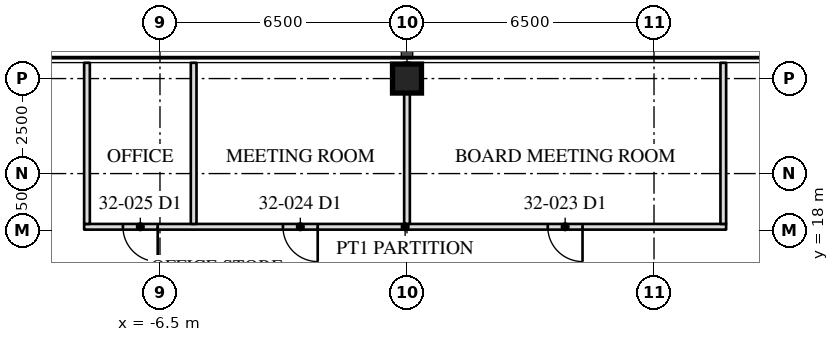
"""IFC4 building model, lengths in metres.
Left out: names, types, materials, properties, quantities, classifications, styles, units other than length and angle.
Written with IfcOpenShell. Run it as: python <this file> out.ifc"""

import sys

from ifc_helpers import new_model, si_unit, direction, frame, frame_2d, origin, origin_2d, place, context, subcontext, project, spatial, rectangle, hollow_rectangle, extrude, element, fill, save


model = new_model("IFC4")
c1 = context("Model", 3, precision=1e-05, world=origin(), true_north=direction((0.0, 1.0)))
c2 = subcontext(c1, "Body", "Model", "MODEL_VIEW")
j1 = project(units=[si_unit("LENGTHUNIT", "METRE"), si_unit("PLANEANGLEUNIT", "RADIAN")], contexts=[c1])
p1 = place(None, origin())
s1 = spatial("IfcSite", under=j1, at=p1, CompositionType="ELEMENT")
p2 = place(p1, origin())
s2 = spatial("IfcBuilding", under=s1, at=p2, CompositionType="ELEMENT")
p3 = place(p2, frame((0.0, 0.0, 137.7)))
s3 = spatial("IfcBuildingStorey", under=s2, at=p3, CompositionType="ELEMENT", Elevation=137.7)
p4 = place(p3, frame((0.0, 22.0, 0.0), z_axis=(0.0, 0.0, 1.0), x_axis=(1.0, 0.0, 0.0)))
e1 = element("IfcColumn", 1, at=p4, inside=s3, PredefinedType="COLUMN", context=c2, shape_type="SweptSolid", body=[
    extrude(hollow_rectangle(XDim=0.762, YDim=0.762, WallThickness=0.076, at=origin_2d()), origin(), (0.0, 0.0, 1.0), 4.1),
])
p5 = place(p3, frame((8.398, 18.1, 0.0), z_axis=(0.0, 0.0, 1.0), x_axis=(-1.0, 0.0, 0.0)))
e2 = element("IfcWall", 2, at=p5, inside=s3, PredefinedType="PARTITIONING", context=c2, shape_type="SweptSolid", body=[
    extrude(rectangle(XDim=16.894, YDim=0.15, at=frame_2d((8.447, 0.0))), origin(), (0.0, 0.0, 1.0), 3.91),
])
p6 = place(p5, frame((3.779, 0.0, 0.0)))
e3 = element("IfcOpeningElement", 3, at=p6, cuts=e2, PredefinedType="OPENING", context=c2, shape_type="SweptSolid", body=[
    extrude(rectangle(XDim=0.915, YDim=2.134, at=frame_2d((0.458, 1.067))), frame((0.0, 0.085, 0.0), z_axis=(0.0, -1.0, 0.0), x_axis=(1.0, 0.0, 0.0)), (0.0, 0.0, 1.0), 0.17),
])
p7 = place(p5, frame((10.748, 0.0, 0.0)))
e4 = element("IfcOpeningElement", 4, at=p7, cuts=e2, PredefinedType="OPENING", context=c2, shape_type="SweptSolid", body=[
    extrude(rectangle(XDim=0.915, YDim=2.134, at=frame_2d((0.458, 1.067))), frame((0.0, 0.085, 0.0), z_axis=(0.0, -1.0, 0.0), x_axis=(1.0, 0.0, 0.0)), (0.0, 0.0, 1.0), 0.17),
])
p8 = place(p5, frame((14.958, 0.0, 0.0)))
e5 = element("IfcOpeningElement", 5, at=p8, cuts=e2, PredefinedType="OPENING", context=c2, shape_type="SweptSolid", body=[
    extrude(rectangle(XDim=0.915, YDim=2.134, at=frame_2d((0.458, 1.067))), frame((0.0, 0.085, 0.0), z_axis=(0.0, -1.0, 0.0), x_axis=(1.0, 0.0, 0.0)), (0.0, 0.0, 1.0), 0.17),
])
p9 = place(p3, frame((8.323, 18.175, 0.0), z_axis=(0.0, 0.0, 1.0), x_axis=(0.0, 1.0, 0.0)))
e6 = element("IfcWall", 6, at=p9, inside=s3, PredefinedType="PARTITIONING", context=c2, shape_type="SweptSolid", body=[
    extrude(rectangle(XDim=4.24, YDim=0.15, at=frame_2d((2.12, 0.0))), origin(), (0.0, 0.0, 1.0), 3.91),
])
p10 = place(p3, frame((0.0, 18.175, 0.0), z_axis=(0.0, 0.0, 1.0), x_axis=(0.0, 1.0, 0.0)))
e7 = element("IfcWall", 7, at=p10, inside=s3, PredefinedType="PARTITIONING", context=c2, shape_type="SweptSolid", body=[
    extrude(rectangle(XDim=4.24, YDim=0.15, at=frame_2d((2.12, 0.0))), origin(), (0.0, 0.0, 1.0), 3.326),
])
for number, where, z_axis, x_axis in (
    (8, (-5.614, 18.175, 0.0), (0.0, 0.0, 1.0), (0.0, 1.0, 0.0)),
    (9, (-8.421, 18.175, 0.0), (0.0, 0.0, 1.0), (0.0, 1.0, 0.0)),
):
    element("IfcWall", number, at=place(p3, frame(where, z_axis=z_axis, x_axis=x_axis)), inside=s3, PredefinedType="PARTITIONING", context=c2, shape_type="SweptSolid", body=[
        extrude(rectangle(XDim=4.24, YDim=0.15, at=frame_2d((2.12, 0.0))), origin(), (0.0, 0.0, 1.0), 3.91),
    ])
p11 = place(p6, origin())
e10 = element("IfcDoor", 10, at=p11, inside=s3, OperationType="SINGLE_SWING_LEFT", PredefinedType="DOOR", context=c2, shape_type="SweptSolid", body=[
    extrude(rectangle(XDim=0.915, YDim=2.134, at=frame_2d((0.458, 1.067))), frame((0.0, 0.025, 0.0), z_axis=(0.0, -1.0, 0.0), x_axis=(1.0, 0.0, 0.0)), (0.0, 0.0, 1.0), 0.05),
])
fill(e3, e10)
p12 = place(p7, origin())
e11 = element("IfcDoor", 11, at=p12, inside=s3, OperationType="SINGLE_SWING_LEFT", PredefinedType="DOOR", context=c2, shape_type="SweptSolid", body=[
    extrude(rectangle(XDim=0.915, YDim=2.134, at=frame_2d((0.458, 1.067))), frame((0.0, 0.025, 0.0), z_axis=(0.0, -1.0, 0.0), x_axis=(1.0, 0.0, 0.0)), (0.0, 0.0, 1.0), 0.05),
])
fill(e4, e11)
p13 = place(p8, origin())
e12 = element("IfcDoor", 12, at=p13, inside=s3, OperationType="SINGLE_SWING_LEFT", PredefinedType="DOOR", context=c2, shape_type="SweptSolid", body=[
    extrude(rectangle(XDim=0.915, YDim=2.134, at=frame_2d((0.458, 1.067))), frame((0.0, 0.025, 0.0), z_axis=(0.0, -1.0, 0.0), x_axis=(1.0, 0.0, 0.0)), (0.0, 0.0, 1.0), 0.05),
])
fill(e5, e12)
save(model, sys.argv[1])
